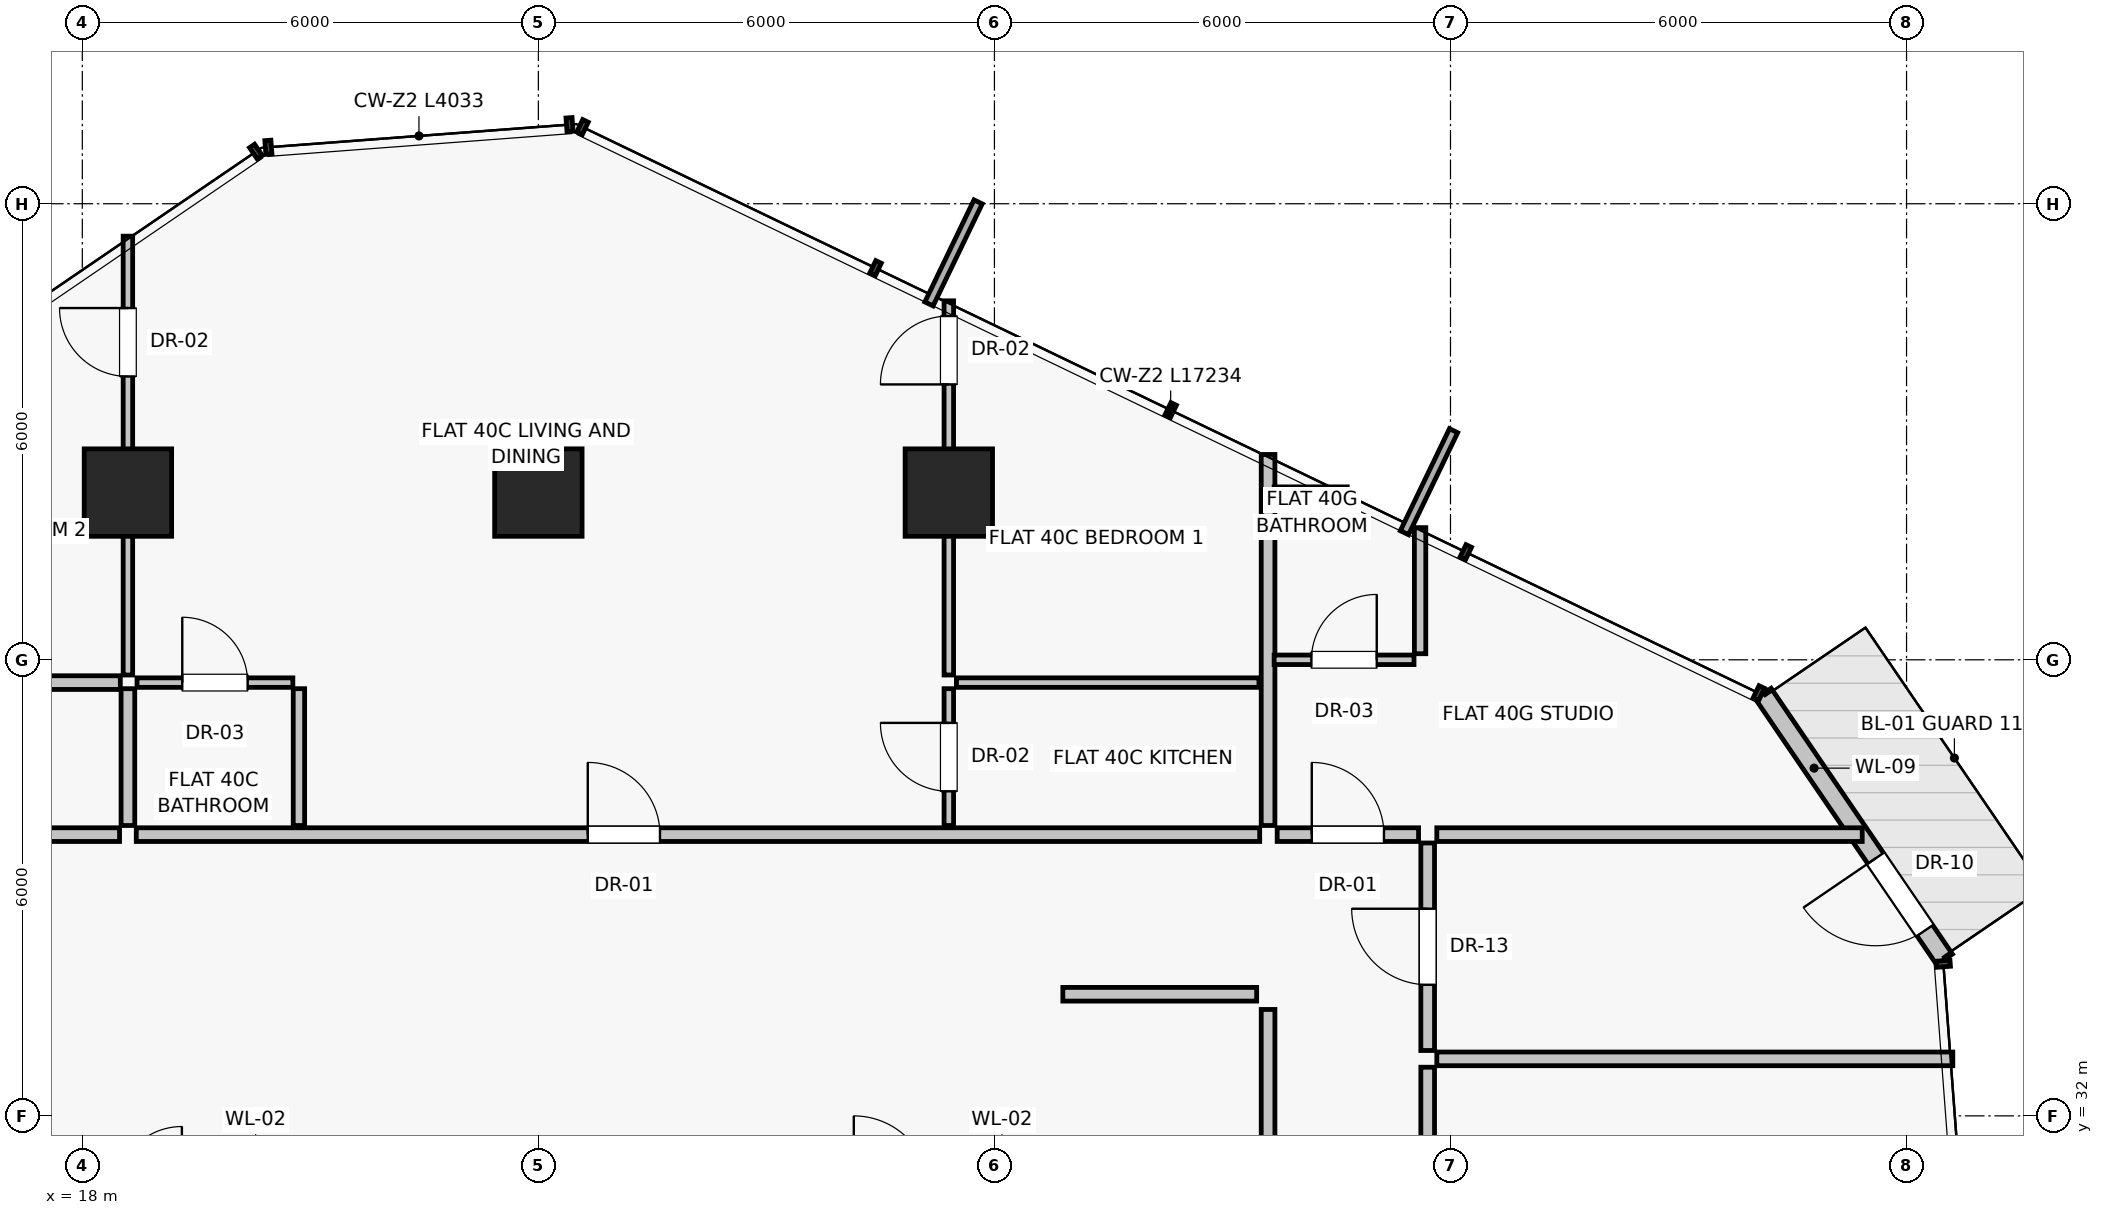
"""IFC4 building model, lengths in metres.
Left out: names, types, materials, properties, quantities, classifications, styles, units other than length and angle.
Written with IfcOpenShell. Run it as: python <this file> out.ifc"""

import sys

from ifc_helpers import new_model, si_unit, direction, frame, frame_2d, origin, origin_2d, place, context, subcontext, project, spatial, rectangle, extrude, source, transform, mapped, element, fill, save


model = new_model("IFC4")
c1 = context("Model", 3, precision=1e-05, world=origin(), true_north=direction((0.0, 1.0)))
c2 = subcontext(c1, "Body", "Model", "MODEL_VIEW")
j1 = project(units=[si_unit("LENGTHUNIT", "METRE"), si_unit("PLANEANGLEUNIT", "RADIAN")], contexts=[c1])
p1 = place(None, origin())
s1 = spatial("IfcSite", under=j1, at=p1, CompositionType="ELEMENT")
p2 = place(p1, origin())
s2 = spatial("IfcBuilding", under=s1, at=p2, CompositionType="ELEMENT")
p3 = place(p2, frame((0.0, 0.0, 142.5)))
s3 = spatial("IfcBuildingStorey", under=s2, at=p3, CompositionType="ELEMENT", Elevation=142.5)
for number, where, z_axis, x_axis in (
    (1, (29.4, 40.2, 0.0), (0.0, 0.0, 1.0), (1.0, 0.0, 0.0)),
    (2, (24.0, 40.2, 0.0), (0.0, 0.0, 1.0), (1.0, 0.0, 0.0)),
    (3, (18.6, 40.2, 0.0), (0.0, 0.0, 1.0), (1.0, 0.0, 0.0)),
):
    element("IfcColumn", number, at=place(p3, frame(where, z_axis=z_axis, x_axis=x_axis)), inside=s3, PredefinedType="COLUMN", context=c2, shape_type="SweptSolid", body=[
        extrude(rectangle(XDim=1.15, YDim=1.15, at=origin_2d()), origin(), (0.0, 0.0, 1.0), 3.25),
    ])
p4 = place(p3, frame((42.5, 34.058, 0.0), z_axis=(0.0, 0.0, 1.0), x_axis=(-0.563546195047, 0.826084551392, 0.0)))
e4 = element("IfcWall", 4, at=p4, inside=s3, PredefinedType="SOLIDWALL", context=c2, shape_type="SweptSolid", body=[
    extrude(rectangle(XDim=4.233, YDim=0.25, at=frame_2d((2.116, 0.0))), origin(), (0.0, 0.0, 1.0), 3.0),
])
p5 = place(p4, frame((0.46, 0.0, 0.0)))
e5 = element("IfcOpeningElement", 5, at=p5, cuts=e4, PredefinedType="OPENING", context=c2, shape_type="SweptSolid", body=[
    extrude(rectangle(XDim=1.15, YDim=2.25, at=frame_2d((0.575, 1.125))), frame((0.0, 0.135, 0.0), z_axis=(0.0, -1.0, 0.0), x_axis=(1.0, 0.0, 0.0)), (0.0, 0.0, 1.0), 0.27),
])
p6 = place(p3, frame((33.6, 24.2, 0.0), z_axis=(0.0, 0.0, 1.0), x_axis=(0.0, 1.0, 0.0)))
e6 = element("IfcWall", 6, at=p6, inside=s3, PredefinedType="PARTITIONING", context=c2, shape_type="SweptSolid", body=[
    extrude(rectangle(XDim=9.2, YDim=0.18, at=frame_2d((4.6, 0.0))), origin(), (0.0, 0.0, 1.0), 3.0),
])
p7 = place(p6, frame((3.8, 0.0, 0.0)))
e7 = element("IfcOpeningElement", 7, at=p7, cuts=e6, PredefinedType="OPENING", context=c2, shape_type="SweptSolid", body=[
    extrude(rectangle(XDim=0.9, YDim=2.01, at=frame_2d((0.45, 1.005))), frame((0.0, 0.1, 0.0), z_axis=(0.0, -1.0, 0.0), x_axis=(1.0, 0.0, 0.0)), (0.0, 0.0, 1.0), 0.2),
])
p8 = place(p3, frame((30.9, 33.6, 0.0), z_axis=(0.0, 0.0, 1.0), x_axis=(1.0, 0.0, 0.0)))
e8 = element("IfcWall", 8, at=p8, inside=s3, PredefinedType="PARTITIONING", context=c2, shape_type="SweptSolid", body=[
    extrude(rectangle(XDim=2.55, YDim=0.18, at=frame_2d((1.275, 0.0))), origin(), (0.0, 0.0, 1.0), 3.0),
])
p9 = place(p3, frame((33.6, 35.82, 0.0), z_axis=(0.0, 0.0, 1.0), x_axis=(0.0, 1.0, 0.0)))
e9 = element("IfcWall", 9, at=p9, inside=s3, PredefinedType="PARTITIONING", context=c2, shape_type="SweptSolid", body=[
    extrude(rectangle(XDim=4.881, YDim=0.18, at=frame_2d((2.441, 0.0))), origin(), (0.0, 0.0, 1.0), 3.0),
])
p10 = place(p3, frame((14.51, 35.7, 0.0), z_axis=(0.0, 0.0, 1.0), x_axis=(1.0, 0.0, 0.0)))
e10 = element("IfcWall", 10, at=p10, inside=s3, PredefinedType="PARTITIONING", context=c2, shape_type="SweptSolid", body=[
    extrude(rectangle(XDim=3.98, YDim=0.18, at=frame_2d((1.99, 0.0))), origin(), (0.0, 0.0, 1.0), 2.58),
])
p11 = place(p10, frame((1.49, 0.0, 0.0)))
e11 = element("IfcOpeningElement", 11, at=p11, cuts=e10, PredefinedType="OPENING", context=c2, shape_type="SweptSolid", body=[
    extrude(rectangle(XDim=1.0, YDim=2.01, at=frame_2d((0.5, 1.005))), frame((0.0, 0.1, 0.0), z_axis=(0.0, -1.0, 0.0), x_axis=(1.0, 0.0, 0.0)), (0.0, 0.0, 1.0), 0.2),
])
p12 = place(p3, frame((18.71, 35.7, 0.0), z_axis=(0.0, 0.0, 1.0), x_axis=(1.0, 0.0, 0.0)))
e12 = element("IfcWall", 12, at=p12, inside=s3, PredefinedType="PARTITIONING", context=c2, shape_type="SweptSolid", body=[
    extrude(rectangle(XDim=14.78, YDim=0.18, at=frame_2d((7.39, 0.0))), origin(), (0.0, 0.0, 1.0), 2.58),
])
p13 = place(p12, frame((5.94, 0.0, 0.0)))
e13 = element("IfcOpeningElement", 13, at=p13, cuts=e12, PredefinedType="OPENING", context=c2, shape_type="SweptSolid", body=[
    extrude(rectangle(XDim=0.95, YDim=2.02, at=frame_2d((0.475, 1.01))), frame((0.0, 0.1, 0.0), z_axis=(0.0, -1.0, 0.0), x_axis=(1.0, 0.0, 0.0)), (0.0, 0.0, 1.0), 0.2),
])
p14 = place(p3, frame((14.52, 37.7, 0.0), z_axis=(0.0, 0.0, 1.0), x_axis=(1.0, 0.0, 0.0)))
e14 = element("IfcWall", 14, at=p14, inside=s3, PredefinedType="PARTITIONING", context=c2, shape_type="SweptSolid", body=[
    extrude(rectangle(XDim=3.98, YDim=0.18, at=frame_2d((1.99, 0.0))), origin(), (0.0, 0.0, 1.0), 3.0),
])
p15 = place(p3, frame((18.6, 35.82, 0.0), z_axis=(0.0, 0.0, 1.0), x_axis=(0.0, 1.0, 0.0)))
e15 = element("IfcWall", 15, at=p15, inside=s3, PredefinedType="PARTITIONING", context=c2, shape_type="SweptSolid", body=[
    extrude(rectangle(XDim=1.8, YDim=0.18, at=frame_2d((0.9, 0.0))), origin(), (0.0, 0.0, 1.0), 2.378),
])
p16 = place(p3, frame((18.6, 37.8, 0.0), z_axis=(0.0, 0.0, 1.0), x_axis=(0.0, 1.0, 0.0)))
e16 = element("IfcWall", 16, at=p16, inside=s3, PredefinedType="PARTITIONING", context=c2, shape_type="SweptSolid", body=[
    extrude(rectangle(XDim=5.773, YDim=0.125, at=frame_2d((2.887, 0.0))), origin(), (0.0, 0.0, 1.0), 2.378),
])
p17 = place(p16, frame((3.928, 0.0, 0.0)))
e17 = element("IfcOpeningElement", 17, at=p17, cuts=e16, PredefinedType="OPENING", context=c2, shape_type="SweptSolid", body=[
    extrude(rectangle(XDim=0.9, YDim=2.01, at=frame_2d((0.45, 1.005))), frame((0.0, 0.073, 0.0), z_axis=(0.0, -1.0, 0.0), x_axis=(1.0, 0.0, 0.0)), (0.0, 0.0, 1.0), 0.145),
])
p18 = place(p3, frame((20.85, 35.82, 0.0), z_axis=(0.0, 0.0, 1.0), x_axis=(0.0, 1.0, 0.0)))
e18 = element("IfcWall", 18, at=p18, inside=s3, PredefinedType="PARTITIONING", context=c2, shape_type="SweptSolid", body=[
    extrude(rectangle(XDim=1.8, YDim=0.15, at=frame_2d((0.9, 0.0))), origin(), (0.0, 0.0, 1.0), 3.0),
])
p19 = place(p3, frame((18.72, 37.7, 0.0), z_axis=(0.0, 0.0, 1.0), x_axis=(1.0, 0.0, 0.0)))
e19 = element("IfcWall", 19, at=p19, inside=s3, PredefinedType="PARTITIONING", context=c2, shape_type="SweptSolid", body=[
    extrude(rectangle(XDim=2.05, YDim=0.125, at=frame_2d((1.025, 0.0))), origin(), (0.0, 0.0, 1.0), 3.0),
])
p20 = place(p19, frame((0.595, 0.0, 0.0)))
e20 = element("IfcOpeningElement", 20, at=p20, cuts=e19, PredefinedType="OPENING", context=c2, shape_type="SweptSolid", body=[
    extrude(rectangle(XDim=0.86, YDim=2.01, at=frame_2d((0.43, 1.005))), frame((0.0, 0.073, 0.0), z_axis=(0.0, -1.0, 0.0), x_axis=(1.0, 0.0, 0.0)), (0.0, 0.0, 1.0), 0.145),
])
p21 = place(p3, frame((29.4, 35.82, 0.0), z_axis=(0.0, 0.0, 1.0), x_axis=(0.0, 1.0, 0.0)))
e21 = element("IfcWall", 21, at=p21, inside=s3, PredefinedType="PARTITIONING", context=c2, shape_type="SweptSolid", body=[
    extrude(rectangle(XDim=1.8, YDim=0.125, at=frame_2d((0.9, 0.0))), origin(), (0.0, 0.0, 1.0), 2.378),
])
p22 = place(p21, frame((0.45, 0.0, 0.0)))
e22 = element("IfcOpeningElement", 22, at=p22, cuts=e21, PredefinedType="OPENING", context=c2, shape_type="SweptSolid", body=[
    extrude(rectangle(XDim=0.9, YDim=2.01, at=frame_2d((0.45, 1.005))), frame((0.0, 0.073, 0.0), z_axis=(0.0, -1.0, 0.0), x_axis=(1.0, 0.0, 0.0)), (0.0, 0.0, 1.0), 0.145),
])
p23 = place(p3, frame((29.5, 37.7, 0.0), z_axis=(0.0, 0.0, 1.0), x_axis=(1.0, 0.0, 0.0)))
e23 = element("IfcWall", 23, at=p23, inside=s3, PredefinedType="PARTITIONING", context=c2, shape_type="SweptSolid", body=[
    extrude(rectangle(XDim=3.98, YDim=0.125, at=frame_2d((1.99, 0.0))), origin(), (0.0, 0.0, 1.0), 3.0),
])
p24 = place(p3, frame((29.4, 37.8, 0.0), z_axis=(0.0, 0.0, 1.0), x_axis=(0.0, 1.0, 0.0)))
e24 = element("IfcWall", 24, at=p24, inside=s3, PredefinedType="PARTITIONING", context=c2, shape_type="SweptSolid", body=[
    extrude(rectangle(XDim=4.923, YDim=0.125, at=frame_2d((2.461, 0.0))), origin(), (0.0, 0.0, 1.0), 2.378),
])
p25 = place(p24, frame((3.823, 0.0, 0.0)))
e25 = element("IfcOpeningElement", 25, at=p25, cuts=e24, PredefinedType="OPENING", context=c2, shape_type="SweptSolid", body=[
    extrude(rectangle(XDim=0.9, YDim=2.01, at=frame_2d((0.45, 1.005))), frame((0.0, 0.073, 0.0), z_axis=(0.0, -1.0, 0.0), x_axis=(1.0, 0.0, 0.0)), (0.0, 0.0, 1.0), 0.145),
])
p26 = place(p3, frame((35.82, 35.7, 0.0), z_axis=(0.0, 0.0, 1.0), x_axis=(1.0, 0.0, 0.0)))
e26 = element("IfcWall", 26, at=p26, inside=s3, PredefinedType="PARTITIONING", context=c2, shape_type="SweptSolid", body=[
    extrude(rectangle(XDim=5.596, YDim=0.18, at=frame_2d((2.798, 0.0))), origin(), (0.0, 0.0, 1.0), 3.0),
])
p27 = place(p3, frame((35.7, 32.86, 0.0), z_axis=(0.0, 0.0, 1.0), x_axis=(0.0, 1.0, 0.0)))
e27 = element("IfcWall", 27, at=p27, inside=s3, PredefinedType="PARTITIONING", context=c2, shape_type="SweptSolid", body=[
    extrude(rectangle(XDim=2.73, YDim=0.18, at=frame_2d((1.365, 0.0))), origin(), (0.0, 0.0, 1.0), 3.0),
])
p28 = place(p27, frame((0.865, 0.0, 0.0)))
e28 = element("IfcOpeningElement", 28, at=p28, cuts=e27, PredefinedType="OPENING", context=c2, shape_type="SweptSolid", body=[
    extrude(rectangle(XDim=1.0, YDim=2.01, at=frame_2d((0.5, 1.005))), frame((0.0, 0.1, 0.0), z_axis=(0.0, -1.0, 0.0), x_axis=(1.0, 0.0, 0.0)), (0.0, 0.0, 1.0), 0.2),
])
p29 = place(p3, frame((35.82, 32.75, 0.0), z_axis=(0.0, 0.0, 1.0), x_axis=(1.0, 0.0, 0.0)))
e29 = element("IfcWall", 29, at=p29, inside=s3, PredefinedType="PARTITIONING", context=c2, shape_type="SweptSolid", body=[
    extrude(rectangle(XDim=6.789, YDim=0.18, at=frame_2d((3.395, 0.0))), origin(), (0.0, 0.0, 1.0), 3.0),
])
p30 = place(p3, frame((35.7, 26.058, 0.0), z_axis=(0.0, 0.0, 1.0), x_axis=(0.0, 1.0, 0.0)))
e30 = element("IfcWall", 30, at=p30, inside=s3, PredefinedType="PARTITIONING", context=c2, shape_type="SweptSolid", body=[
    extrude(rectangle(XDim=6.582, YDim=0.18, at=frame_2d((3.291, 0.0))), origin(), (0.0, 0.0, 1.0), 2.58),
])
p31 = place(p30, frame((4.072, 0.0, 0.0)))
e31 = element("IfcOpeningElement", 31, at=p31, cuts=e30, PredefinedType="OPENING", context=c2, shape_type="SweptSolid", body=[
    extrude(rectangle(XDim=0.95, YDim=2.02, at=frame_2d((0.475, 1.01))), frame((0.0, 0.1, 0.0), z_axis=(0.0, -1.0, 0.0), x_axis=(1.0, 0.0, 0.0)), (0.0, 0.0, 1.0), 0.2),
])
p32 = place(p3, frame((33.72, 35.7, 0.0), z_axis=(0.0, 0.0, 1.0), x_axis=(1.0, 0.0, 0.0)))
e32 = element("IfcWall", 32, at=p32, inside=s3, PredefinedType="PARTITIONING", context=c2, shape_type="SweptSolid", body=[
    extrude(rectangle(XDim=1.86, YDim=0.18, at=frame_2d((0.93, 0.0))), origin(), (0.0, 0.0, 1.0), 3.0),
])
p33 = place(p32, frame((0.455, 0.0, 0.0)))
e33 = element("IfcOpeningElement", 33, at=p33, cuts=e32, PredefinedType="OPENING", context=c2, shape_type="SweptSolid", body=[
    extrude(rectangle(XDim=0.95, YDim=2.02, at=frame_2d((0.475, 1.01))), frame((0.0, 0.1, 0.0), z_axis=(0.0, -1.0, 0.0), x_axis=(1.0, 0.0, 0.0)), (0.0, 0.0, 1.0), 0.2),
])
p34 = place(p3, frame((33.68, 38.0, 0.0), z_axis=(0.0, 0.0, 1.0), x_axis=(1.0, 0.0, 0.0)))
e34 = element("IfcWall", 34, at=p34, inside=s3, PredefinedType="PARTITIONING", context=c2, shape_type="SweptSolid", body=[
    extrude(rectangle(XDim=1.84, YDim=0.125, at=frame_2d((0.92, 0.0))), origin(), (0.0, 0.0, 1.0), 3.0),
])
p35 = place(p34, frame((0.49, 0.0, 0.0)))
e35 = element("IfcOpeningElement", 35, at=p35, cuts=e34, PredefinedType="OPENING", context=c2, shape_type="SweptSolid", body=[
    extrude(rectangle(XDim=0.86, YDim=2.01, at=frame_2d((0.43, 1.005))), frame((0.0, 0.073, 0.0), z_axis=(0.0, -1.0, 0.0), x_axis=(1.0, 0.0, 0.0)), (0.0, 0.0, 1.0), 0.145),
])
p36 = place(p3, frame((33.68, 40.2, 0.0), z_axis=(0.0, 0.0, 1.0), x_axis=(1.0, 0.0, 0.0)))
e36 = element("IfcWall", 36, at=p36, inside=s3, PredefinedType="PARTITIONING", context=c2, shape_type="SweptSolid", body=[
    extrude(rectangle(XDim=0.962, YDim=0.15, at=frame_2d((0.481, 0.0))), origin(), (0.0, 0.0, 1.0), 3.0),
])
p37 = place(p3, frame((35.6, 38.08, 0.0), z_axis=(0.0, 0.0, 1.0), x_axis=(0.0, 1.0, 0.0)))
e37 = element("IfcWall", 37, at=p37, inside=s3, PredefinedType="PARTITIONING", context=c2, shape_type="SweptSolid", body=[
    extrude(rectangle(XDim=1.659, YDim=0.15, at=frame_2d((0.83, 0.0))), origin(), (0.0, 0.0, 1.0), 3.0),
])
m1 = source(origin(), c2, "Body", "SweptSolid", [
    extrude(rectangle(XDim=1.15, YDim=2.25, at=frame_2d((0.575, 1.125))), frame((0.0, 0.025, 0.0), z_axis=(0.0, -1.0, 0.0), x_axis=(1.0, 0.0, 0.0)), (0.0, 0.0, 1.0), 0.05),
])
p38 = place(p5, frame((1.15, 0.0, 0.0), z_axis=(0.0, 0.0, 1.0), x_axis=(-1.0, 0.0, 0.0)))
e38 = element("IfcDoor", 38, at=p38, inside=s3, OperationType="SINGLE_SWING_RIGHT", PredefinedType="DOOR", context=c2, shape_type="MappedRepresentation", body=[
    mapped(m1, transform((0.0, 0.0, 0.0), scale=1.0)),
])
fill(e5, e38)
m2 = source(origin(), c2, "Body", "SweptSolid", [
    extrude(rectangle(XDim=0.95, YDim=2.02, at=frame_2d((0.475, 1.01))), frame((0.0, 0.025, 0.0), z_axis=(0.0, -1.0, 0.0), x_axis=(1.0, 0.0, 0.0)), (0.0, 0.0, 1.0), 0.05),
])
p39 = place(p13, origin())
e39 = element("IfcDoor", 39, at=p39, inside=s3, OperationType="SINGLE_SWING_LEFT", PredefinedType="DOOR", context=c2, shape_type="MappedRepresentation", body=[
    mapped(m2, transform((0.0, 0.0, 0.0), scale=1.0)),
])
fill(e13, e39)
m3 = source(origin(), c2, "Body", "SweptSolid", [
    extrude(rectangle(XDim=0.9, YDim=2.01, at=frame_2d((0.45, 1.005))), frame((0.0, 0.025, 0.0), z_axis=(0.0, -1.0, 0.0), x_axis=(1.0, 0.0, 0.0)), (0.0, 0.0, 1.0), 0.05),
])
p40 = place(p17, origin())
e40 = element("IfcDoor", 40, at=p40, inside=s3, OperationType="SINGLE_SWING_RIGHT", PredefinedType="DOOR", context=c2, shape_type="MappedRepresentation", body=[
    mapped(m3, transform((0.0, 0.0, 0.0), scale=1.0)),
])
fill(e17, e40)
m4 = source(origin(), c2, "Body", "SweptSolid", [
    extrude(rectangle(XDim=0.86, YDim=2.01, at=frame_2d((0.43, 1.005))), frame((0.0, 0.025, 0.0), z_axis=(0.0, -1.0, 0.0), x_axis=(1.0, 0.0, 0.0)), (0.0, 0.0, 1.0), 0.05),
])
p41 = place(p20, origin())
e41 = element("IfcDoor", 41, at=p41, inside=s3, OperationType="SINGLE_SWING_LEFT", PredefinedType="DOOR", context=c2, shape_type="MappedRepresentation", body=[
    mapped(m4, transform((0.0, 0.0, 0.0), scale=1.0)),
])
fill(e20, e41)
p42 = place(p22, origin())
e42 = element("IfcDoor", 42, at=p42, inside=s3, OperationType="SINGLE_SWING_RIGHT", PredefinedType="DOOR", context=c2, shape_type="MappedRepresentation", body=[
    mapped(m3, transform((0.0, 0.0, 0.0), scale=1.0)),
])
fill(e22, e42)
p43 = place(p25, origin())
e43 = element("IfcDoor", 43, at=p43, inside=s3, OperationType="SINGLE_SWING_LEFT", PredefinedType="DOOR", context=c2, shape_type="MappedRepresentation", body=[
    mapped(m3, transform((0.0, 0.0, 0.0), scale=1.0)),
])
fill(e25, e43)
m5 = source(origin(), c2, "Body", "SweptSolid", [
    extrude(rectangle(XDim=1.0, YDim=2.01, at=frame_2d((0.5, 1.005))), frame((0.0, 0.025, 0.0), z_axis=(0.0, -1.0, 0.0), x_axis=(1.0, 0.0, 0.0)), (0.0, 0.0, 1.0), 0.05),
])
p44 = place(p28, origin())
e44 = element("IfcDoor", 44, at=p44, inside=s3, OperationType="SINGLE_SWING_RIGHT", PredefinedType="DOOR", context=c2, shape_type="MappedRepresentation", body=[
    mapped(m5, transform((0.0, 0.0, 0.0), scale=1.0)),
])
fill(e28, e44)
p45 = place(p33, origin())
e45 = element("IfcDoor", 45, at=p45, inside=s3, OperationType="SINGLE_SWING_LEFT", PredefinedType="DOOR", context=c2, shape_type="MappedRepresentation", body=[
    mapped(m2, transform((0.0, 0.0, 0.0), scale=1.0)),
])
fill(e33, e45)
p46 = place(p35, origin())
e46 = element("IfcDoor", 46, at=p46, inside=s3, OperationType="SINGLE_SWING_RIGHT", PredefinedType="DOOR", context=c2, shape_type="MappedRepresentation", body=[
    mapped(m4, transform((0.0, 0.0, 0.0), scale=1.0)),
])
fill(e35, e46)
save(model, sys.argv[1])
